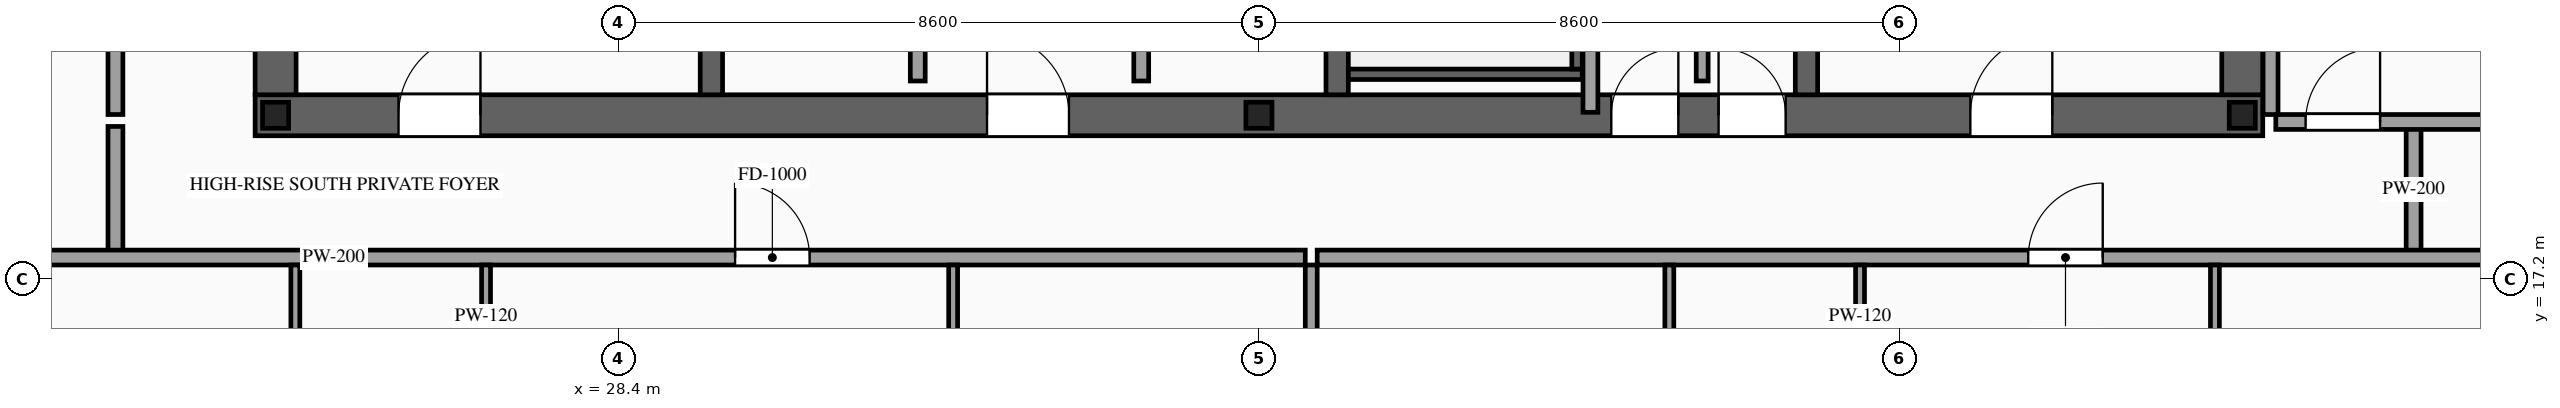
"""IFC4 building model, lengths in metres.
Left out: names, types, materials, properties, quantities, classifications, styles, units other than length and angle.
Written with IfcOpenShell. Run it as: python <this file> out.ifc"""

import sys

from ifc_helpers import new_model, si_unit, direction, frame, frame_2d, origin, origin_2d, place, context, subcontext, project, spatial, rectangle, i_section, extrude, source, transform, mapped, element, fill, save


model = new_model("IFC4")
c1 = context("Model", 3, precision=1e-05, world=origin(), true_north=direction((0.0, 1.0)))
c2 = subcontext(c1, "Body", "Model", "MODEL_VIEW")
j1 = project(units=[si_unit("LENGTHUNIT", "METRE"), si_unit("PLANEANGLEUNIT", "RADIAN")], contexts=[c1])
p1 = place(None, origin())
s1 = spatial("IfcSite", under=j1, at=p1, CompositionType="ELEMENT")
p2 = place(p1, origin())
s2 = spatial("IfcBuilding", under=s1, at=p2, CompositionType="ELEMENT")
p3 = place(p2, frame((0.0, 0.0, 282.1)))
s3 = spatial("IfcBuildingStorey", under=s2, at=p3, CompositionType="ELEMENT", Elevation=282.1)
p4 = place(p3, frame((23.525, 19.4, 0.0), z_axis=(0.0, 0.0, 1.0), x_axis=(1.0, 0.0, 0.0)))
e1 = element("IfcWall", 1, at=p4, inside=s3, PredefinedType="SHEAR", context=c2, shape_type="SweptSolid", body=[
    extrude(rectangle(XDim=26.95, YDim=0.55, at=frame_2d((13.475, 0.0))), origin(), (0.0, 0.0, 1.0), 3.5),
])
p5 = place(p4, frame((1.925, 0.0, 0.0)))
e2 = element("IfcOpeningElement", 2, at=p5, cuts=e1, PredefinedType="OPENING", context=c2, shape_type="SweptSolid", body=[
    extrude(rectangle(XDim=1.1, YDim=2.2, at=frame_2d((0.55, 1.1))), frame((0.0, 0.29, 0.0), z_axis=(0.0, -1.0, 0.0), x_axis=(1.0, 0.0, 0.0)), (0.0, 0.0, 1.0), 0.58),
])
p6 = place(p4, frame((9.825, 0.0, 0.0)))
e3 = element("IfcOpeningElement", 3, at=p6, cuts=e1, PredefinedType="OPENING", context=c2, shape_type="SweptSolid", body=[
    extrude(rectangle(XDim=1.1, YDim=2.2, at=frame_2d((0.55, 1.1))), frame((0.0, 0.29, 0.0), z_axis=(0.0, -1.0, 0.0), x_axis=(1.0, 0.0, 0.0)), (0.0, 0.0, 1.0), 0.58),
])
p7 = place(p4, frame((23.025, 0.0, 0.0)))
e4 = element("IfcOpeningElement", 4, at=p7, cuts=e1, PredefinedType="OPENING", context=c2, shape_type="SweptSolid", body=[
    extrude(rectangle(XDim=1.1, YDim=2.2, at=frame_2d((0.55, 1.1))), frame((0.0, 0.29, 0.0), z_axis=(0.0, -1.0, 0.0), x_axis=(1.0, 0.0, 0.0)), (0.0, 0.0, 1.0), 0.58),
])
p8 = place(p4, frame((19.645, 0.0, 0.0)))
e5 = element("IfcOpeningElement", 5, at=p8, cuts=e1, PredefinedType="OPENING", context=c2, shape_type="SweptSolid", body=[
    extrude(rectangle(XDim=0.9, YDim=2.15, at=frame_2d((0.45, 1.075))), frame((0.0, 0.29, 0.0), z_axis=(0.0, -1.0, 0.0), x_axis=(1.0, 0.0, 0.0)), (0.0, 0.0, 1.0), 0.58),
])
p9 = place(p4, frame((18.205, 0.0, 0.0)))
e6 = element("IfcOpeningElement", 6, at=p9, cuts=e1, PredefinedType="OPENING", context=c2, shape_type="SweptSolid", body=[
    extrude(rectangle(XDim=0.9, YDim=2.15, at=frame_2d((0.45, 1.075))), frame((0.0, 0.29, 0.0), z_axis=(0.0, -1.0, 0.0), x_axis=(1.0, 0.0, 0.0)), (0.0, 0.0, 1.0), 0.58),
])
m1 = source(origin(), c2, "Body", "SweptSolid", [
    extrude(rectangle(XDim=12.25, YDim=0.55, at=frame_2d((6.125, 0.0))), origin(), (0.0, 0.0, 1.0), 3.5),
])
for number, where, z_axis, x_axis in (
    (7, (23.8, 19.675, 0.0), (0.0, 0.0, 1.0), (0.0, 1.0, 0.0)),
    (8, (50.2, 19.675, 0.0), (0.0, 0.0, 1.0), (0.0, 1.0, 0.0)),
):
    element("IfcWall", number, at=place(p3, frame(where, z_axis=z_axis, x_axis=x_axis)), inside=s3, PredefinedType="SHEAR", context=c2, shape_type="MappedRepresentation", body=[
        mapped(m1, transform((0.0, 0.0, 0.0), scale=1.0)),
    ])
m2 = source(origin(), c2, "Body", "SweptSolid", [
    extrude(rectangle(XDim=12.25, YDim=0.3, at=frame_2d((6.125, 0.0))), origin(), (0.0, 0.0, 1.0), 3.5),
])
for number, where, z_axis, x_axis in (
    (9, (29.65, 19.675, 0.0), (0.0, 0.0, 1.0), (0.0, 1.0, 0.0)),
    (10, (38.05, 19.675, 0.0), (0.0, 0.0, 1.0), (0.0, 1.0, 0.0)),
):
    element("IfcWall", number, at=place(p3, frame(where, z_axis=z_axis, x_axis=x_axis)), inside=s3, PredefinedType="SOLIDWALL", context=c2, shape_type="MappedRepresentation", body=[
        mapped(m2, transform((0.0, 0.0, 0.0), scale=1.0)),
    ])
p10 = place(p3, frame((44.35, 19.675, 0.0), z_axis=(0.0, 0.0, 1.0), x_axis=(0.0, 1.0, 0.0)))
e11 = element("IfcWall", 11, at=p10, inside=s3, PredefinedType="SOLIDWALL", context=c2, shape_type="SweptSolid", body=[
    extrude(rectangle(XDim=12.25, YDim=0.3, at=frame_2d((6.125, 0.0))), origin(), (0.0, 0.0, 1.0), 3.5),
])
p11 = place(p10, frame((6.525, 0.0, 0.0)))
e12 = element("IfcOpeningElement", 12, at=p11, cuts=e11, PredefinedType="OPENING", context=c2, shape_type="SweptSolid", body=[
    extrude(rectangle(XDim=1.1, YDim=2.2, at=frame_2d((0.55, 1.1))), frame((0.0, 0.165, 0.0), z_axis=(0.0, -1.0, 0.0), x_axis=(1.0, 0.0, 0.0)), (0.0, 0.0, 1.0), 0.33),
])
p12 = place(p10, frame((8.625, 0.0, 0.0)))
e13 = element("IfcOpeningElement", 13, at=p12, cuts=e11, PredefinedType="OPENING", context=c2, shape_type="SweptSolid", body=[
    extrude(rectangle(XDim=1.1, YDim=2.2, at=frame_2d((0.55, 1.1))), frame((0.0, 0.165, 0.0), z_axis=(0.0, -1.0, 0.0), x_axis=(1.0, 0.0, 0.0)), (0.0, 0.0, 1.0), 0.33),
])
p13 = place(p10, frame((10.725, 0.0, 0.0)))
e14 = element("IfcOpeningElement", 14, at=p13, cuts=e11, PredefinedType="OPENING", context=c2, shape_type="SweptSolid", body=[
    extrude(rectangle(XDim=1.1, YDim=2.2, at=frame_2d((0.55, 1.1))), frame((0.0, 0.165, 0.0), z_axis=(0.0, -1.0, 0.0), x_axis=(1.0, 0.0, 0.0)), (0.0, 0.0, 1.0), 0.33),
])
m3 = source(origin(), c2, "Body", "SweptSolid", [
    extrude(i_section(OverallWidth=0.35, OverallDepth=0.35, WebThickness=0.012, FlangeThickness=0.019, at=origin_2d()), origin(), (0.0, 0.0, 1.0), 3.5),
])
for number, where, z_axis, x_axis in (
    (15, (23.8, 19.4, 0.0), (0.0, 0.0, 1.0), (1.0, 0.0, 0.0)),
    (16, (37.0, 19.4, 0.0), (0.0, 0.0, 1.0), (1.0, 0.0, 0.0)),
    (17, (50.2, 19.4, 0.0), (0.0, 0.0, 1.0), (1.0, 0.0, 0.0)),
):
    element("IfcColumn", number, at=place(p3, frame(where, z_axis=z_axis, x_axis=x_axis)), inside=s3, PredefinedType="COLUMN", context=c2, shape_type="MappedRepresentation", body=[
        mapped(m3, transform((0.0, 0.0, 0.0), scale=1.0)),
    ])
m4 = source(origin(), c2, "Body", "SweptSolid", [
    extrude(rectangle(XDim=3.14, YDim=0.14, at=frame_2d((1.57, 0.0))), origin(), (0.0, 0.0, 1.0), 3.28),
])
p14 = place(p3, frame((38.2, 19.95, 0.0), z_axis=(0.0, 0.0, 1.0), x_axis=(1.0, 0.0, 0.0)))
e18 = element("IfcWall", 18, at=p14, inside=s3, PredefinedType="SOLIDWALL", context=c2, shape_type="MappedRepresentation", body=[
    mapped(m4, transform((0.0, 0.0, 0.0), scale=1.0)),
])
m5 = source(origin(), c2, "Body", "SweptSolid", [
    extrude(rectangle(XDim=8.94, YDim=0.14, at=frame_2d((4.47, 0.0))), origin(), (0.0, 0.0, 1.0), 3.28),
])
p15 = place(p3, frame((41.27, 20.02, 0.0), z_axis=(0.0, 0.0, 1.0), x_axis=(0.0, 1.0, 0.0)))
e19 = element("IfcWall", 19, at=p15, inside=s3, PredefinedType="SOLIDWALL", context=c2, shape_type="MappedRepresentation", body=[
    mapped(m5, transform((0.0, 0.0, 0.0), scale=1.0)),
])
p16 = place(p3, frame((32.42, 19.86, 0.0), z_axis=(0.0, 0.0, 1.0), x_axis=(0.0, 1.0, 0.0)))
e20 = element("IfcWall", 20, at=p16, inside=s3, PredefinedType="PARTITIONING", context=c2, shape_type="SweptSolid", body=[
    extrude(rectangle(XDim=11.88, YDim=0.2, at=frame_2d((5.94, 0.0))), origin(), (0.0, 0.0, 1.0), 3.28),
])
p17 = place(p16, frame((5.49, 0.0, 0.0)))
e21 = element("IfcOpeningElement", 21, at=p17, cuts=e20, PredefinedType="OPENING", context=c2, shape_type="SweptSolid", body=[
    extrude(rectangle(XDim=0.9, YDim=2.15, at=frame_2d((0.45, 1.075))), frame((0.0, 0.115, 0.0), z_axis=(0.0, -1.0, 0.0), x_axis=(1.0, 0.0, 0.0)), (0.0, 0.0, 1.0), 0.23),
])
p18 = place(p3, frame((35.42, 19.86, 0.0), z_axis=(0.0, 0.0, 1.0), x_axis=(0.0, 1.0, 0.0)))
e22 = element("IfcWall", 22, at=p18, inside=s3, PredefinedType="PARTITIONING", context=c2, shape_type="SweptSolid", body=[
    extrude(rectangle(XDim=6.94, YDim=0.2, at=frame_2d((3.47, 0.0))), origin(), (0.0, 0.0, 1.0), 3.28),
])
p19 = place(p18, frame((3.02, 0.0, 0.0)))
e23 = element("IfcOpeningElement", 23, at=p19, cuts=e22, PredefinedType="OPENING", context=c2, shape_type="SweptSolid", body=[
    extrude(rectangle(XDim=0.9, YDim=2.15, at=frame_2d((0.45, 1.075))), frame((0.0, 0.115, 0.0), z_axis=(0.0, -1.0, 0.0), x_axis=(1.0, 0.0, 0.0)), (0.0, 0.0, 1.0), 0.23),
])
m6 = source(origin(), c2, "Body", "SweptSolid", [
    extrude(rectangle(XDim=1.34, YDim=0.16, at=frame_2d((0.67, 0.0))), origin(), (0.0, 0.0, 1.0), 3.28),
])
p20 = place(p3, frame((42.95, 19.86, 0.0), z_axis=(0.0, 0.0, 1.0), x_axis=(0.0, 1.0, 0.0)))
e24 = element("IfcWall", 24, at=p20, inside=s3, PredefinedType="PARTITIONING", context=c2, shape_type="MappedRepresentation", body=[
    mapped(m6, transform((0.0, 0.0, 0.0), scale=1.0)),
])
m7 = source(origin(), c2, "Body", "SweptSolid", [
    extrude(rectangle(XDim=6.06, YDim=0.2, at=frame_2d((3.03, 0.0))), origin(), (0.0, 0.0, 1.0), 3.28),
])
p21 = place(p3, frame((41.45, 19.44, 0.0), z_axis=(0.0, 0.0, 1.0), x_axis=(0.0, 1.0, 0.0)))
e25 = element("IfcWall", 25, at=p21, inside=s3, PredefinedType="PARTITIONING", context=c2, shape_type="MappedRepresentation", body=[
    mapped(m7, transform((0.0, 0.0, 0.0), scale=1.0)),
])
m8 = source(origin(), c2, "Body", "SweptSolid", [
    extrude(rectangle(XDim=1.7, YDim=0.2, at=frame_2d((0.85, 0.0))), origin(), (0.0, 0.0, 1.0), 3.28),
])
for number, where, z_axis, x_axis in (
    (26, (21.65, 17.55, 0.0), (0.0, 0.0, 1.0), (0.0, 1.0, 0.0)),
    (27, (52.5, 17.55, 0.0), (0.0, 0.0, 1.0), (0.0, 1.0, 0.0)),
):
    element("IfcWall", number, at=place(p3, frame(where, z_axis=z_axis, x_axis=x_axis)), inside=s3, PredefinedType="PARTITIONING", context=c2, shape_type="MappedRepresentation", body=[
        mapped(m8, transform((0.0, 0.0, 0.0), scale=1.0)),
    ])
p22 = place(p3, frame((19.44, 17.49, 0.0), z_axis=(0.0, 0.0, 1.0), x_axis=(1.0, 0.0, 0.0)))
e28 = element("IfcWall", 28, at=p22, inside=s3, PredefinedType="PARTITIONING", context=c2, shape_type="SweptSolid", body=[
    extrude(rectangle(XDim=18.182, YDim=0.2, at=frame_2d((9.091, 0.0))), origin(), (0.0, 0.0, 1.0), 3.28),
])
p23 = place(p22, frame((10.528, 0.0, 0.0)))
e29 = element("IfcOpeningElement", 29, at=p23, cuts=e28, PredefinedType="OPENING", context=c2, shape_type="SweptSolid", body=[
    extrude(rectangle(XDim=1.0, YDim=2.2, at=frame_2d((0.5, 1.1))), frame((0.0, 0.115, 0.0), z_axis=(0.0, -1.0, 0.0), x_axis=(1.0, 0.0, 0.0)), (0.0, 0.0, 1.0), 0.23),
])
m9 = source(origin(), c2, "Body", "SweptSolid", [
    extrude(rectangle(XDim=12.04, YDim=0.16, at=frame_2d((6.02, 0.0))), origin(), (0.0, 0.0, 1.0), 3.28),
])
p24 = place(p3, frame((37.702, 5.35, 0.0), z_axis=(0.0, 0.0, 1.0), x_axis=(0.0, 1.0, 0.0)))
e30 = element("IfcWall", 30, at=p24, inside=s3, PredefinedType="PARTITIONING", context=c2, shape_type="MappedRepresentation", body=[
    mapped(m9, transform((0.0, 0.0, 0.0), scale=1.0)),
])
m10 = source(origin(), c2, "Body", "SweptSolid", [
    extrude(rectangle(XDim=4.11, YDim=0.12, at=frame_2d((2.055, 0.0))), origin(), (0.0, 0.0, 1.0), 3.28),
])
p25 = place(p3, frame((24.065, 13.28, 0.0), z_axis=(0.0, 0.0, 1.0), x_axis=(0.0, 1.0, 0.0)))
e31 = element("IfcWall", 31, at=p25, inside=s3, PredefinedType="PARTITIONING", context=c2, shape_type="MappedRepresentation", body=[
    mapped(m10, transform((0.0, 0.0, 0.0), scale=1.0)),
])
p26 = place(p3, frame((26.625, 13.28, 0.0), z_axis=(0.0, 0.0, 1.0), x_axis=(0.0, 1.0, 0.0)))
e32 = element("IfcWall", 32, at=p26, inside=s3, PredefinedType="PARTITIONING", context=c2, shape_type="SweptSolid", body=[
    extrude(rectangle(XDim=4.11, YDim=0.12, at=frame_2d((2.055, 0.0))), origin(), (0.0, 0.0, 1.0), 3.28),
])
p27 = place(p26, frame((1.63, 0.0, 0.0)))
e33 = element("IfcOpeningElement", 33, at=p27, cuts=e32, PredefinedType="OPENING", context=c2, shape_type="SweptSolid", body=[
    extrude(rectangle(XDim=0.85, YDim=2.1, at=frame_2d((0.425, 1.05))), frame((0.0, 0.075, 0.0), z_axis=(0.0, -1.0, 0.0), x_axis=(1.0, 0.0, 0.0)), (0.0, 0.0, 1.0), 0.15),
])
p28 = place(p3, frame((32.895, 13.28, 0.0), z_axis=(0.0, 0.0, 1.0), x_axis=(0.0, 1.0, 0.0)))
e34 = element("IfcWall", 34, at=p28, inside=s3, PredefinedType="PARTITIONING", context=c2, shape_type="MappedRepresentation", body=[
    mapped(m10, transform((0.0, 0.0, 0.0), scale=1.0)),
])
p29 = place(p3, frame((37.782, 17.49, 0.0), z_axis=(0.0, 0.0, 1.0), x_axis=(1.0, 0.0, 0.0)))
e35 = element("IfcWall", 35, at=p29, inside=s3, PredefinedType="PARTITIONING", context=c2, shape_type="SweptSolid", body=[
    extrude(rectangle(XDim=16.778, YDim=0.2, at=frame_2d((8.389, 0.0))), origin(), (0.0, 0.0, 1.0), 3.28),
])
p30 = place(p29, frame((9.545, 0.0, 0.0)))
e36 = element("IfcOpeningElement", 36, at=p30, cuts=e35, PredefinedType="OPENING", context=c2, shape_type="SweptSolid", body=[
    extrude(rectangle(XDim=1.0, YDim=2.2, at=frame_2d((0.5, 1.1))), frame((0.0, 0.115, 0.0), z_axis=(0.0, -1.0, 0.0), x_axis=(1.0, 0.0, 0.0)), (0.0, 0.0, 1.0), 0.23),
])
p31 = place(p3, frame((42.509, 13.28, 0.0), z_axis=(0.0, 0.0, 1.0), x_axis=(0.0, 1.0, 0.0)))
e37 = element("IfcWall", 37, at=p31, inside=s3, PredefinedType="PARTITIONING", context=c2, shape_type="MappedRepresentation", body=[
    mapped(m10, transform((0.0, 0.0, 0.0), scale=1.0)),
])
p32 = place(p3, frame((45.069, 13.28, 0.0), z_axis=(0.0, 0.0, 1.0), x_axis=(0.0, 1.0, 0.0)))
e38 = element("IfcWall", 38, at=p32, inside=s3, PredefinedType="PARTITIONING", context=c2, shape_type="SweptSolid", body=[
    extrude(rectangle(XDim=4.11, YDim=0.12, at=frame_2d((2.055, 0.0))), origin(), (0.0, 0.0, 1.0), 3.28),
])
p33 = place(p32, frame((1.63, 0.0, 0.0)))
e39 = element("IfcOpeningElement", 39, at=p33, cuts=e38, PredefinedType="OPENING", context=c2, shape_type="SweptSolid", body=[
    extrude(rectangle(XDim=0.85, YDim=2.1, at=frame_2d((0.425, 1.05))), frame((0.0, 0.075, 0.0), z_axis=(0.0, -1.0, 0.0), x_axis=(1.0, 0.0, 0.0)), (0.0, 0.0, 1.0), 0.15),
])
p34 = place(p3, frame((49.833, 13.28, 0.0), z_axis=(0.0, 0.0, 1.0), x_axis=(0.0, 1.0, 0.0)))
e40 = element("IfcWall", 40, at=p34, inside=s3, PredefinedType="PARTITIONING", context=c2, shape_type="MappedRepresentation", body=[
    mapped(m10, transform((0.0, 0.0, 0.0), scale=1.0)),
])
p35 = place(p3, frame((21.65, 19.41, 0.0), z_axis=(0.0, 0.0, 1.0), x_axis=(0.0, 1.0, 0.0)))
e41 = element("IfcWall", 41, at=p35, inside=s3, PredefinedType="PARTITIONING", context=c2, shape_type="SweptSolid", body=[
    extrude(rectangle(XDim=12.78, YDim=0.2, at=frame_2d((6.39, 0.0))), origin(), (0.0, 0.0, 1.0), 3.28),
])
p36 = place(p35, frame((5.042, 0.0, 0.0)))
e42 = element("IfcOpeningElement", 42, at=p36, cuts=e41, PredefinedType="OPENING", context=c2, shape_type="SweptSolid", body=[
    extrude(rectangle(XDim=1.0, YDim=2.2, at=frame_2d((0.5, 1.1))), frame((0.0, 0.115, 0.0), z_axis=(0.0, -1.0, 0.0), x_axis=(1.0, 0.0, 0.0)), (0.0, 0.0, 1.0), 0.23),
])
p37 = place(p3, frame((50.65, 19.31, 0.0), z_axis=(0.0, 0.0, 1.0), x_axis=(1.0, 0.0, 0.0)))
e43 = element("IfcWall", 43, at=p37, inside=s3, PredefinedType="PARTITIONING", context=c2, shape_type="SweptSolid", body=[
    extrude(rectangle(XDim=6.8, YDim=0.2, at=frame_2d((3.4, 0.0))), origin(), (0.0, 0.0, 1.0), 3.28),
])
p38 = place(p37, frame((0.4, 0.0, 0.0)))
e44 = element("IfcOpeningElement", 44, at=p38, cuts=e43, PredefinedType="OPENING", context=c2, shape_type="SweptSolid", body=[
    extrude(rectangle(XDim=1.0, YDim=2.2, at=frame_2d((0.5, 1.1))), frame((0.0, 0.115, 0.0), z_axis=(0.0, -1.0, 0.0), x_axis=(1.0, 0.0, 0.0)), (0.0, 0.0, 1.0), 0.23),
])
m11 = source(origin(), c2, "Body", "SweptSolid", [
    extrude(rectangle(XDim=12.78, YDim=0.2, at=frame_2d((6.39, 0.0))), origin(), (0.0, 0.0, 1.0), 3.28),
])
p39 = place(p3, frame((50.58, 19.41, 0.0), z_axis=(0.0, 0.0, 1.0), x_axis=(0.0, 1.0, 0.0)))
e45 = element("IfcWall", 45, at=p39, inside=s3, PredefinedType="PARTITIONING", context=c2, shape_type="MappedRepresentation", body=[
    mapped(m11, transform((0.0, 0.0, 0.0), scale=1.0)),
])
m12 = source(origin(), c2, "Body", "SweptSolid", [
    extrude(rectangle(XDim=1.1, YDim=2.2, at=frame_2d((0.55, 1.1))), frame((0.0, 0.025, 0.0), z_axis=(0.0, -1.0, 0.0), x_axis=(1.0, 0.0, 0.0)), (0.0, 0.0, 1.0), 0.05),
])
p40 = place(p5, origin())
e46 = element("IfcDoor", 46, at=p40, inside=s3, OperationType="SINGLE_SWING_RIGHT", PredefinedType="DOOR", context=c2, shape_type="MappedRepresentation", body=[
    mapped(m12, transform((0.0, 0.0, 0.0), scale=1.0)),
])
fill(e2, e46)
p41 = place(p6, origin())
e47 = element("IfcDoor", 47, at=p41, inside=s3, OperationType="SINGLE_SWING_LEFT", PredefinedType="DOOR", context=c2, shape_type="MappedRepresentation", body=[
    mapped(m12, transform((0.0, 0.0, 0.0), scale=1.0)),
])
fill(e3, e47)
p42 = place(p7, origin())
e48 = element("IfcDoor", 48, at=p42, inside=s3, OperationType="SINGLE_SWING_RIGHT", PredefinedType="DOOR", context=c2, shape_type="MappedRepresentation", body=[
    mapped(m12, transform((0.0, 0.0, 0.0), scale=1.0)),
])
fill(e4, e48)
m13 = source(origin(), c2, "Body", "SweptSolid", [
    extrude(rectangle(XDim=0.9, YDim=2.15, at=frame_2d((0.45, 1.075))), frame((0.0, 0.025, 0.0), z_axis=(0.0, -1.0, 0.0), x_axis=(1.0, 0.0, 0.0)), (0.0, 0.0, 1.0), 0.05),
])
p43 = place(p8, origin())
e49 = element("IfcDoor", 49, at=p43, inside=s3, OperationType="SINGLE_SWING_LEFT", PredefinedType="DOOR", context=c2, shape_type="MappedRepresentation", body=[
    mapped(m13, transform((0.0, 0.0, 0.0), scale=1.0)),
])
fill(e5, e49)
p44 = place(p9, origin())
e50 = element("IfcDoor", 50, at=p44, inside=s3, OperationType="SINGLE_SWING_RIGHT", PredefinedType="DOOR", context=c2, shape_type="MappedRepresentation", body=[
    mapped(m13, transform((0.0, 0.0, 0.0), scale=1.0)),
])
fill(e6, e50)
m14 = source(origin(), c2, "Body", "SweptSolid", [
    extrude(rectangle(XDim=1.0, YDim=2.2, at=frame_2d((0.5, 1.1))), frame((0.0, 0.025, 0.0), z_axis=(0.0, -1.0, 0.0), x_axis=(1.0, 0.0, 0.0)), (0.0, 0.0, 1.0), 0.05),
])
p45 = place(p23, origin())
e51 = element("IfcDoor", 51, at=p45, inside=s3, OperationType="SINGLE_SWING_LEFT", PredefinedType="DOOR", context=c2, shape_type="MappedRepresentation", body=[
    mapped(m14, transform((0.0, 0.0, 0.0), scale=1.0)),
])
fill(e29, e51)
p46 = place(p30, origin())
e52 = element("IfcDoor", 52, at=p46, inside=s3, OperationType="SINGLE_SWING_RIGHT", PredefinedType="DOOR", context=c2, shape_type="MappedRepresentation", body=[
    mapped(m14, transform((0.0, 0.0, 0.0), scale=1.0)),
])
fill(e36, e52)
p47 = place(p38, origin())
e53 = element("IfcDoor", 53, at=p47, inside=s3, OperationType="SINGLE_SWING_RIGHT", PredefinedType="DOOR", context=c2, shape_type="MappedRepresentation", body=[
    mapped(m14, transform((0.0, 0.0, 0.0), scale=1.0)),
])
fill(e44, e53)
save(model, sys.argv[1])
